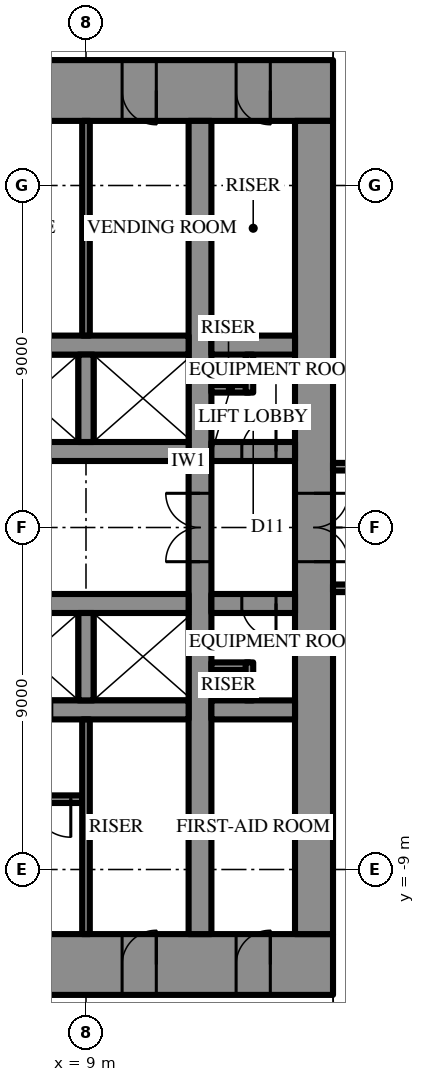
"""IFC4 building model, lengths in metres.
Left out: names, types, materials, properties, quantities, classifications, styles, units other than length and angle.
Written with IfcOpenShell. Run it as: python <this file> out.ifc"""

import sys

from ifc_helpers import new_model, si_unit, direction, frame, frame_2d, origin, place, context, subcontext, project, spatial, rectangle, extrude, element, fill, save


model = new_model("IFC4")
c1 = context("Model", 3, precision=1e-05, world=origin(), true_north=direction((0.0, 1.0)))
c2 = subcontext(c1, "Body", "Model", "MODEL_VIEW")
j1 = project(units=[si_unit("LENGTHUNIT", "METRE"), si_unit("PLANEANGLEUNIT", "RADIAN")], contexts=[c1])
p1 = place(None, origin())
s1 = spatial("IfcSite", under=j1, at=p1, CompositionType="ELEMENT")
p2 = place(p1, origin())
s2 = spatial("IfcBuilding", under=s1, at=p2, CompositionType="ELEMENT")
p3 = place(p2, frame((0.0, 0.0, 257.5)))
s3 = spatial("IfcBuildingStorey", under=s2, at=p3, CompositionType="ELEMENT", Elevation=257.5)
p4 = place(p3, frame((-15.5, 11.5, 0.0), z_axis=(0.0, 0.0, 1.0), x_axis=(1.0, 0.0, 0.0)))
e1 = element("IfcWall", 1, at=p4, inside=s3, PredefinedType="SHEAR", context=c2, shape_type="SweptSolid", body=[
    extrude(rectangle(XDim=31.0, YDim=1.6, at=frame_2d((15.5, 0.0))), origin(), (0.0, 0.0, 1.0), 4.2),
])
p5 = place(p4, frame((16.35, 0.0, 0.0)))
e2 = element("IfcOpeningElement", 2, at=p5, cuts=e1, PredefinedType="OPENING", context=c2, shape_type="SweptSolid", body=[
    extrude(rectangle(XDim=0.9, YDim=2.2, at=frame_2d((0.45, 1.1))), frame((0.0, 0.81, 0.0), z_axis=(0.0, -1.0, 0.0), x_axis=(1.0, 0.0, 0.0)), (0.0, 0.0, 1.0), 1.62),
])
p6 = place(p4, frame((19.35, 0.0, 0.0)))
e3 = element("IfcOpeningElement", 3, at=p6, cuts=e1, PredefinedType="OPENING", context=c2, shape_type="SweptSolid", body=[
    extrude(rectangle(XDim=0.9, YDim=2.2, at=frame_2d((0.45, 1.1))), frame((0.0, 0.81, 0.0), z_axis=(0.0, -1.0, 0.0), x_axis=(1.0, 0.0, 0.0)), (0.0, 0.0, 1.0), 1.62),
])
p7 = place(p4, frame((22.4, 0.0, 0.0)))
e4 = element("IfcOpeningElement", 4, at=p7, cuts=e1, PredefinedType="OPENING", context=c2, shape_type="SweptSolid", body=[
    extrude(rectangle(XDim=1.0, YDim=2.2, at=frame_2d((0.5, 1.1))), frame((0.0, 0.81, 0.0), z_axis=(0.0, -1.0, 0.0), x_axis=(1.0, 0.0, 0.0)), (0.0, 0.0, 1.0), 1.62),
])
p8 = place(p4, frame((1.65, 0.0, 0.0)))
e5 = element("IfcOpeningElement", 5, at=p8, cuts=e1, PredefinedType="OPENING", context=c2, shape_type="SweptSolid", body=[
    extrude(rectangle(XDim=0.9, YDim=2.2, at=frame_2d((0.45, 1.1))), frame((0.0, 0.81, 0.0), z_axis=(0.0, -1.0, 0.0), x_axis=(1.0, 0.0, 0.0)), (0.0, 0.0, 1.0), 1.62),
])
p9 = place(p4, frame((4.65, 0.0, 0.0)))
e6 = element("IfcOpeningElement", 6, at=p9, cuts=e1, PredefinedType="OPENING", context=c2, shape_type="SweptSolid", body=[
    extrude(rectangle(XDim=0.9, YDim=2.2, at=frame_2d((0.45, 1.1))), frame((0.0, 0.81, 0.0), z_axis=(0.0, -1.0, 0.0), x_axis=(1.0, 0.0, 0.0)), (0.0, 0.0, 1.0), 1.62),
])
p10 = place(p4, frame((25.45, 0.0, 0.0)))
e7 = element("IfcOpeningElement", 7, at=p10, cuts=e1, PredefinedType="OPENING", context=c2, shape_type="SweptSolid", body=[
    extrude(rectangle(XDim=0.9, YDim=2.2, at=frame_2d((0.45, 1.1))), frame((0.0, 0.81, 0.0), z_axis=(0.0, -1.0, 0.0), x_axis=(1.0, 0.0, 0.0)), (0.0, 0.0, 1.0), 1.62),
])
p11 = place(p4, frame((28.45, 0.0, 0.0)))
e8 = element("IfcOpeningElement", 8, at=p11, cuts=e1, PredefinedType="OPENING", context=c2, shape_type="SweptSolid", body=[
    extrude(rectangle(XDim=0.9, YDim=2.2, at=frame_2d((0.45, 1.1))), frame((0.0, 0.81, 0.0), z_axis=(0.0, -1.0, 0.0), x_axis=(1.0, 0.0, 0.0)), (0.0, 0.0, 1.0), 1.62),
])
p12 = place(p3, frame((15.5, -11.5, 0.0), z_axis=(0.0, 0.0, 1.0), x_axis=(-1.0, 0.0, 0.0)))
e9 = element("IfcWall", 9, at=p12, inside=s3, PredefinedType="SHEAR", context=c2, shape_type="SweptSolid", body=[
    extrude(rectangle(XDim=31.0, YDim=1.6, at=frame_2d((15.5, 0.0))), origin(), (0.0, 0.0, 1.0), 4.2),
])
p13 = place(p12, frame((16.35, 0.0, 0.0)))
e10 = element("IfcOpeningElement", 10, at=p13, cuts=e9, PredefinedType="OPENING", context=c2, shape_type="SweptSolid", body=[
    extrude(rectangle(XDim=0.9, YDim=2.2, at=frame_2d((0.45, 1.1))), frame((0.0, 0.81, 0.0), z_axis=(0.0, -1.0, 0.0), x_axis=(1.0, 0.0, 0.0)), (0.0, 0.0, 1.0), 1.62),
])
p14 = place(p12, frame((19.35, 0.0, 0.0)))
e11 = element("IfcOpeningElement", 11, at=p14, cuts=e9, PredefinedType="OPENING", context=c2, shape_type="SweptSolid", body=[
    extrude(rectangle(XDim=0.9, YDim=2.2, at=frame_2d((0.45, 1.1))), frame((0.0, 0.81, 0.0), z_axis=(0.0, -1.0, 0.0), x_axis=(1.0, 0.0, 0.0)), (0.0, 0.0, 1.0), 1.62),
])
p15 = place(p12, frame((22.4, 0.0, 0.0)))
e12 = element("IfcOpeningElement", 12, at=p15, cuts=e9, PredefinedType="OPENING", context=c2, shape_type="SweptSolid", body=[
    extrude(rectangle(XDim=1.0, YDim=2.2, at=frame_2d((0.5, 1.1))), frame((0.0, 0.81, 0.0), z_axis=(0.0, -1.0, 0.0), x_axis=(1.0, 0.0, 0.0)), (0.0, 0.0, 1.0), 1.62),
])
p16 = place(p12, frame((1.65, 0.0, 0.0)))
e13 = element("IfcOpeningElement", 13, at=p16, cuts=e9, PredefinedType="OPENING", context=c2, shape_type="SweptSolid", body=[
    extrude(rectangle(XDim=0.9, YDim=2.2, at=frame_2d((0.45, 1.1))), frame((0.0, 0.81, 0.0), z_axis=(0.0, -1.0, 0.0), x_axis=(1.0, 0.0, 0.0)), (0.0, 0.0, 1.0), 1.62),
])
p17 = place(p12, frame((4.65, 0.0, 0.0)))
e14 = element("IfcOpeningElement", 14, at=p17, cuts=e9, PredefinedType="OPENING", context=c2, shape_type="SweptSolid", body=[
    extrude(rectangle(XDim=0.9, YDim=2.2, at=frame_2d((0.45, 1.1))), frame((0.0, 0.81, 0.0), z_axis=(0.0, -1.0, 0.0), x_axis=(1.0, 0.0, 0.0)), (0.0, 0.0, 1.0), 1.62),
])
p18 = place(p12, frame((25.45, 0.0, 0.0)))
e15 = element("IfcOpeningElement", 15, at=p18, cuts=e9, PredefinedType="OPENING", context=c2, shape_type="SweptSolid", body=[
    extrude(rectangle(XDim=0.9, YDim=2.2, at=frame_2d((0.45, 1.1))), frame((0.0, 0.81, 0.0), z_axis=(0.0, -1.0, 0.0), x_axis=(1.0, 0.0, 0.0)), (0.0, 0.0, 1.0), 1.62),
])
p19 = place(p12, frame((28.45, 0.0, 0.0)))
e16 = element("IfcOpeningElement", 16, at=p19, cuts=e9, PredefinedType="OPENING", context=c2, shape_type="SweptSolid", body=[
    extrude(rectangle(XDim=0.9, YDim=2.2, at=frame_2d((0.45, 1.1))), frame((0.0, 0.81, 0.0), z_axis=(0.0, -1.0, 0.0), x_axis=(1.0, 0.0, 0.0)), (0.0, 0.0, 1.0), 1.62),
])
p20 = place(p3, frame((15.0, -10.7, 0.0), z_axis=(0.0, 0.0, 1.0), x_axis=(0.0, 1.0, 0.0)))
e17 = element("IfcWall", 17, at=p20, inside=s3, PredefinedType="SHEAR", context=c2, shape_type="SweptSolid", body=[
    extrude(rectangle(XDim=21.4, YDim=1.0, at=frame_2d((10.7, 0.0))), origin(), (0.0, 0.0, 1.0), 4.2),
])
p21 = place(p20, frame((9.8, 0.0, 0.0)))
e18 = element("IfcOpeningElement", 18, at=p21, cuts=e17, PredefinedType="OPENING", context=c2, shape_type="SweptSolid", body=[
    extrude(rectangle(XDim=1.8, YDim=2.4, at=frame_2d((0.9, 1.2))), frame((0.0, 0.51, 0.0), z_axis=(0.0, -1.0, 0.0), x_axis=(1.0, 0.0, 0.0)), (0.0, 0.0, 1.0), 1.02),
])
p22 = place(p3, frame((12.0, -10.7, 0.0), z_axis=(0.0, 0.0, 1.0), x_axis=(0.0, 1.0, 0.0)))
e19 = element("IfcWall", 19, at=p22, inside=s3, PredefinedType="SHEAR", context=c2, shape_type="SweptSolid", body=[
    extrude(rectangle(XDim=21.4, YDim=0.6, at=frame_2d((10.7, 0.0))), origin(), (0.0, 0.0, 1.0), 4.2),
])
p23 = place(p22, frame((9.8, 0.0, 0.0)))
e20 = element("IfcOpeningElement", 20, at=p23, cuts=e19, PredefinedType="OPENING", context=c2, shape_type="SweptSolid", body=[
    extrude(rectangle(XDim=1.8, YDim=2.4, at=frame_2d((0.9, 1.2))), frame((0.0, 0.31, 0.0), z_axis=(0.0, -1.0, 0.0), x_axis=(1.0, 0.0, 0.0)), (0.0, 0.0, 1.0), 0.62),
])
p24 = place(p3, frame((-3.2, 2.0, 0.0), z_axis=(0.0, 0.0, 1.0), x_axis=(1.0, 0.0, 0.0)))
e21 = element("IfcWall", 21, at=p24, inside=s3, PredefinedType="SHEAR", context=c2, shape_type="SweptSolid", body=[
    extrude(rectangle(XDim=14.9, YDim=0.5, at=frame_2d((7.45, 0.0))), origin(), (0.0, 0.0, 1.0), 4.2),
])
p25 = place(p24, frame((1.15, 0.0, 0.0)))
e22 = element("IfcOpeningElement", 22, at=p25, cuts=e21, PredefinedType="OPENING", context=c2, shape_type="SweptSolid", body=[
    extrude(rectangle(XDim=1.1, YDim=2.2, at=frame_2d((0.55, 1.1))), frame((0.0, 0.26, 0.0), z_axis=(0.0, -1.0, 0.0), x_axis=(1.0, 0.0, 0.0)), (0.0, 0.0, 1.0), 0.52),
])
p26 = place(p24, frame((4.15, 0.0, 0.0)))
e23 = element("IfcOpeningElement", 23, at=p26, cuts=e21, PredefinedType="OPENING", context=c2, shape_type="SweptSolid", body=[
    extrude(rectangle(XDim=1.1, YDim=2.2, at=frame_2d((0.55, 1.1))), frame((0.0, 0.26, 0.0), z_axis=(0.0, -1.0, 0.0), x_axis=(1.0, 0.0, 0.0)), (0.0, 0.0, 1.0), 0.52),
])
p27 = place(p24, frame((7.15, 0.0, 0.0)))
e24 = element("IfcOpeningElement", 24, at=p27, cuts=e21, PredefinedType="OPENING", context=c2, shape_type="SweptSolid", body=[
    extrude(rectangle(XDim=1.1, YDim=2.2, at=frame_2d((0.55, 1.1))), frame((0.0, 0.26, 0.0), z_axis=(0.0, -1.0, 0.0), x_axis=(1.0, 0.0, 0.0)), (0.0, 0.0, 1.0), 0.52),
])
p28 = place(p24, frame((10.15, 0.0, 0.0)))
e25 = element("IfcOpeningElement", 25, at=p28, cuts=e21, PredefinedType="OPENING", context=c2, shape_type="SweptSolid", body=[
    extrude(rectangle(XDim=1.1, YDim=2.2, at=frame_2d((0.55, 1.1))), frame((0.0, 0.26, 0.0), z_axis=(0.0, -1.0, 0.0), x_axis=(1.0, 0.0, 0.0)), (0.0, 0.0, 1.0), 0.52),
])
p29 = place(p3, frame((12.3, 2.0, 0.0), z_axis=(0.0, 0.0, 1.0), x_axis=(1.0, 0.0, 0.0)))
e26 = element("IfcWall", 26, at=p29, inside=s3, PredefinedType="SHEAR", context=c2, shape_type="SweptSolid", body=[
    extrude(rectangle(XDim=2.2, YDim=0.5, at=frame_2d((1.1, 0.0))), origin(), (0.0, 0.0, 1.0), 4.2),
])
p30 = place(p29, frame((0.8, 0.0, 0.0)))
e27 = element("IfcOpeningElement", 27, at=p30, cuts=e26, PredefinedType="OPENING", context=c2, shape_type="SweptSolid", body=[
    extrude(rectangle(XDim=0.9, YDim=2.2, at=frame_2d((0.45, 1.1))), frame((0.0, 0.26, 0.0), z_axis=(0.0, -1.0, 0.0), x_axis=(1.0, 0.0, 0.0)), (0.0, 0.0, 1.0), 0.52),
])
p31 = place(p3, frame((-11.7, 4.8, 0.0), z_axis=(0.0, 0.0, 1.0), x_axis=(1.0, 0.0, 0.0)))
e28 = element("IfcWall", 28, at=p31, inside=s3, PredefinedType="SHEAR", context=c2, shape_type="SweptSolid", body=[
    extrude(rectangle(XDim=23.4, YDim=0.5, at=frame_2d((11.7, 0.0))), origin(), (0.0, 0.0, 1.0), 4.2),
])
p32 = place(p31, frame((6.6, 0.0, 0.0)))
e29 = element("IfcOpeningElement", 29, at=p32, cuts=e28, PredefinedType="OPENING", context=c2, shape_type="SweptSolid", body=[
    extrude(rectangle(XDim=1.2, YDim=2.2, at=frame_2d((0.6, 1.1))), frame((0.0, 0.26, 0.0), z_axis=(0.0, -1.0, 0.0), x_axis=(1.0, 0.0, 0.0)), (0.0, 0.0, 1.0), 0.52),
])
p33 = place(p31, frame((3.6, 0.0, 0.0)))
e30 = element("IfcOpeningElement", 30, at=p33, cuts=e28, PredefinedType="OPENING", context=c2, shape_type="SweptSolid", body=[
    extrude(rectangle(XDim=1.2, YDim=2.2, at=frame_2d((0.6, 1.1))), frame((0.0, 0.26, 0.0), z_axis=(0.0, -1.0, 0.0), x_axis=(1.0, 0.0, 0.0)), (0.0, 0.0, 1.0), 0.52),
])
p34 = place(p3, frame((12.3, 4.8, 0.0), z_axis=(0.0, 0.0, 1.0), x_axis=(1.0, 0.0, 0.0)))
e31 = element("IfcWall", 31, at=p34, inside=s3, PredefinedType="SHEAR", context=c2, shape_type="SweptSolid", body=[
    extrude(rectangle(XDim=2.2, YDim=0.5, at=frame_2d((1.1, 0.0))), origin(), (0.0, 0.0, 1.0), 4.2),
])
p35 = place(p3, frame((9.0, 2.25, 0.0), z_axis=(0.0, 0.0, 1.0), x_axis=(0.0, 1.0, 0.0)))
e32 = element("IfcWall", 32, at=p35, inside=s3, PredefinedType="SHEAR", context=c2, shape_type="SweptSolid", body=[
    extrude(rectangle(XDim=2.3, YDim=0.4, at=frame_2d((1.15, 0.0))), origin(), (0.0, 0.0, 1.0), 4.2),
])
p36 = place(p3, frame((14.5, -2.0, 0.0), z_axis=(0.0, 0.0, 1.0), x_axis=(-1.0, 0.0, 0.0)))
e33 = element("IfcWall", 33, at=p36, inside=s3, PredefinedType="SHEAR", context=c2, shape_type="SweptSolid", body=[
    extrude(rectangle(XDim=2.2, YDim=0.5, at=frame_2d((1.1, 0.0))), origin(), (0.0, 0.0, 1.0), 4.2),
])
p37 = place(p36, frame((0.5, 0.0, 0.0)))
e34 = element("IfcOpeningElement", 34, at=p37, cuts=e33, PredefinedType="OPENING", context=c2, shape_type="SweptSolid", body=[
    extrude(rectangle(XDim=0.9, YDim=2.2, at=frame_2d((0.45, 1.1))), frame((0.0, 0.26, 0.0), z_axis=(0.0, -1.0, 0.0), x_axis=(1.0, 0.0, 0.0)), (0.0, 0.0, 1.0), 0.52),
])
p38 = place(p3, frame((11.7, -2.0, 0.0), z_axis=(0.0, 0.0, 1.0), x_axis=(-1.0, 0.0, 0.0)))
e35 = element("IfcWall", 35, at=p38, inside=s3, PredefinedType="SHEAR", context=c2, shape_type="SweptSolid", body=[
    extrude(rectangle(XDim=5.9, YDim=0.5, at=frame_2d((2.95, 0.0))), origin(), (0.0, 0.0, 1.0), 4.2),
])
p39 = place(p3, frame((14.5, -4.8, 0.0), z_axis=(0.0, 0.0, 1.0), x_axis=(-1.0, 0.0, 0.0)))
e36 = element("IfcWall", 36, at=p39, inside=s3, PredefinedType="SHEAR", context=c2, shape_type="SweptSolid", body=[
    extrude(rectangle(XDim=2.2, YDim=0.5, at=frame_2d((1.1, 0.0))), origin(), (0.0, 0.0, 1.0), 4.2),
])
p40 = place(p3, frame((11.7, -4.8, 0.0), z_axis=(0.0, 0.0, 1.0), x_axis=(-1.0, 0.0, 0.0)))
e37 = element("IfcWall", 37, at=p40, inside=s3, PredefinedType="SHEAR", context=c2, shape_type="SweptSolid", body=[
    extrude(rectangle(XDim=23.4, YDim=0.5, at=frame_2d((11.7, 0.0))), origin(), (0.0, 0.0, 1.0), 4.2),
])
p41 = place(p40, frame((6.6, 0.0, 0.0)))
e38 = element("IfcOpeningElement", 38, at=p41, cuts=e37, PredefinedType="OPENING", context=c2, shape_type="SweptSolid", body=[
    extrude(rectangle(XDim=1.2, YDim=2.2, at=frame_2d((0.6, 1.1))), frame((0.0, 0.26, 0.0), z_axis=(0.0, -1.0, 0.0), x_axis=(1.0, 0.0, 0.0)), (0.0, 0.0, 1.0), 0.52),
])
p42 = place(p40, frame((3.6, 0.0, 0.0)))
e39 = element("IfcOpeningElement", 39, at=p42, cuts=e37, PredefinedType="OPENING", context=c2, shape_type="SweptSolid", body=[
    extrude(rectangle(XDim=1.2, YDim=2.2, at=frame_2d((0.6, 1.1))), frame((0.0, 0.26, 0.0), z_axis=(0.0, -1.0, 0.0), x_axis=(1.0, 0.0, 0.0)), (0.0, 0.0, 1.0), 0.52),
])
p43 = place(p3, frame((9.0, -2.25, 0.0), z_axis=(0.0, 0.0, 1.0), x_axis=(0.0, -1.0, 0.0)))
e40 = element("IfcWall", 40, at=p43, inside=s3, PredefinedType="SHEAR", context=c2, shape_type="SweptSolid", body=[
    extrude(rectangle(XDim=2.3, YDim=0.4, at=frame_2d((1.15, 0.0))), origin(), (0.0, 0.0, 1.0), 4.2),
])
p44 = place(p3, frame((8.9, -7.15, 0.0), z_axis=(0.0, 0.0, 1.0), x_axis=(-1.0, 0.0, 0.0)))
e41 = element("IfcWall", 41, at=p44, inside=s3, PredefinedType="SHEAR", context=c2, shape_type="SweptSolid", body=[
    extrude(rectangle(XDim=8.6, YDim=0.2, at=frame_2d((4.3, 0.0))), origin(), (0.0, 0.0, 1.0), 4.2),
])
p45 = place(p44, frame((0.3, 0.0, 0.0)))
e42 = element("IfcOpeningElement", 42, at=p45, cuts=e41, PredefinedType="OPENING", context=c2, shape_type="SweptSolid", body=[
    extrude(rectangle(XDim=1.0, YDim=2.2, at=frame_2d((0.5, 1.1))), frame((0.0, 0.11, 0.0), z_axis=(0.0, -1.0, 0.0), x_axis=(1.0, 0.0, 0.0)), (0.0, 0.0, 1.0), 0.22),
])
for number, where, z_axis, x_axis in (
    (43, (9.0, 5.05, 0.0), (0.0, 0.0, 1.0), (0.0, 1.0, 0.0)),
    (44, (9.0, -5.05, 0.0), (0.0, 0.0, 1.0), (0.0, -1.0, 0.0)),
):
    element("IfcWall", number, at=place(p3, frame(where, z_axis=z_axis, x_axis=x_axis)), inside=s3, PredefinedType="PARTITIONING", context=c2, shape_type="SweptSolid", body=[
        extrude(rectangle(XDim=5.65, YDim=0.2, at=frame_2d((2.825, 0.0))), origin(), (0.0, 0.0, 1.0), 4.0),
    ])
for number, where, z_axis, x_axis in (
    (45, (12.3, 3.65, 0.0), (0.0, 0.0, 1.0), (1.0, 0.0, 0.0)),
    (46, (13.3, 3.55, 0.0), (0.0, 0.0, 1.0), (0.0, 1.0, 0.0)),
    (47, (13.3, -3.65, 0.0), (0.0, 0.0, 1.0), (-1.0, 0.0, 0.0)),
    (48, (13.3, -3.55, 0.0), (0.0, 0.0, 1.0), (0.0, -1.0, 0.0)),
):
    element("IfcWall", number, at=place(p3, frame(where, z_axis=z_axis, x_axis=x_axis)), inside=s3, PredefinedType="PARTITIONING", context=c2, shape_type="SweptSolid", body=[
        extrude(rectangle(XDim=1.0, YDim=0.2, at=frame_2d((0.5, 0.0))), origin(), (0.0, 0.0, 1.0), 4.0),
    ])
p46 = place(p3, frame((15.5, 1.6, 0.0), z_axis=(0.0, 0.0, 1.0), x_axis=(1.0, 0.0, 0.0)))
e49 = element("IfcWall", 49, at=p46, inside=s3, PredefinedType="PARTITIONING", context=c2, shape_type="SweptSolid", body=[
    extrude(rectangle(XDim=2.3, YDim=0.2, at=frame_2d((1.15, 0.0))), origin(), (0.0, 0.0, 1.0), 4.0),
])
p47 = place(p3, frame((15.5, -1.6, 0.0), z_axis=(0.0, 0.0, 1.0), x_axis=(1.0, 0.0, 0.0)))
e50 = element("IfcWall", 50, at=p47, inside=s3, PredefinedType="PARTITIONING", context=c2, shape_type="SweptSolid", body=[
    extrude(rectangle(XDim=9.7, YDim=0.2, at=frame_2d((4.85, 0.0))), origin(), (0.0, 0.0, 1.0), 4.0),
])
p48 = place(p47, frame((6.29, 0.0, 0.0)))
e51 = element("IfcOpeningElement", 51, at=p48, cuts=e50, PredefinedType="OPENING", context=c2, shape_type="SweptSolid", body=[
    extrude(rectangle(XDim=1.0, YDim=2.2, at=frame_2d((0.5, 1.1))), frame((0.0, 0.11, 0.0), z_axis=(0.0, -1.0, 0.0), x_axis=(1.0, 0.0, 0.0)), (0.0, 0.0, 1.0), 0.22),
])
p49 = place(p21, frame((1.8, 0.0, 0.0), z_axis=(0.0, 0.0, 1.0), x_axis=(-1.0, 0.0, 0.0)))
e52 = element("IfcDoor", 52, at=p49, inside=s3, OperationType="DOUBLE_DOOR_SINGLE_SWING", PredefinedType="DOOR", context=c2, shape_type="SweptSolid", body=[
    extrude(rectangle(XDim=1.8, YDim=2.4, at=frame_2d((0.9, 1.2))), frame((0.0, 0.025, 0.0), z_axis=(0.0, -1.0, 0.0), x_axis=(1.0, 0.0, 0.0)), (0.0, 0.0, 1.0), 0.05),
])
fill(e18, e52)
p50 = place(p10, frame((0.9, 0.0, 0.0), z_axis=(0.0, 0.0, 1.0), x_axis=(-1.0, 0.0, 0.0)))
e53 = element("IfcDoor", 53, at=p50, inside=s3, OperationType="SINGLE_SWING_RIGHT", PredefinedType="DOOR", context=c2, shape_type="SweptSolid", body=[
    extrude(rectangle(XDim=0.9, YDim=2.2, at=frame_2d((0.45, 1.1))), frame((0.0, 0.025, 0.0), z_axis=(0.0, -1.0, 0.0), x_axis=(1.0, 0.0, 0.0)), (0.0, 0.0, 1.0), 0.05),
])
fill(e7, e53)
p51 = place(p11, frame((0.9, 0.0, 0.0), z_axis=(0.0, 0.0, 1.0), x_axis=(-1.0, 0.0, 0.0)))
e54 = element("IfcDoor", 54, at=p51, inside=s3, OperationType="SINGLE_SWING_RIGHT", PredefinedType="DOOR", context=c2, shape_type="SweptSolid", body=[
    extrude(rectangle(XDim=0.9, YDim=2.2, at=frame_2d((0.45, 1.1))), frame((0.0, 0.025, 0.0), z_axis=(0.0, -1.0, 0.0), x_axis=(1.0, 0.0, 0.0)), (0.0, 0.0, 1.0), 0.05),
])
fill(e8, e54)
p52 = place(p45, origin())
e55 = element("IfcDoor", 55, at=p52, inside=s3, OperationType="SINGLE_SWING_RIGHT", PredefinedType="DOOR", context=c2, shape_type="SweptSolid", body=[
    extrude(rectangle(XDim=1.0, YDim=2.2, at=frame_2d((0.5, 1.1))), frame((0.0, 0.025, 0.0), z_axis=(0.0, -1.0, 0.0), x_axis=(1.0, 0.0, 0.0)), (0.0, 0.0, 1.0), 0.05),
])
fill(e42, e55)
p53 = place(p16, frame((0.9, 0.0, 0.0), z_axis=(0.0, 0.0, 1.0), x_axis=(-1.0, 0.0, 0.0)))
e56 = element("IfcDoor", 56, at=p53, inside=s3, OperationType="SINGLE_SWING_LEFT", PredefinedType="DOOR", context=c2, shape_type="SweptSolid", body=[
    extrude(rectangle(XDim=0.9, YDim=2.2, at=frame_2d((0.45, 1.1))), frame((0.0, 0.025, 0.0), z_axis=(0.0, -1.0, 0.0), x_axis=(1.0, 0.0, 0.0)), (0.0, 0.0, 1.0), 0.05),
])
fill(e13, e56)
p54 = place(p17, frame((0.9, 0.0, 0.0), z_axis=(0.0, 0.0, 1.0), x_axis=(-1.0, 0.0, 0.0)))
e57 = element("IfcDoor", 57, at=p54, inside=s3, OperationType="SINGLE_SWING_LEFT", PredefinedType="DOOR", context=c2, shape_type="SweptSolid", body=[
    extrude(rectangle(XDim=0.9, YDim=2.2, at=frame_2d((0.45, 1.1))), frame((0.0, 0.025, 0.0), z_axis=(0.0, -1.0, 0.0), x_axis=(1.0, 0.0, 0.0)), (0.0, 0.0, 1.0), 0.05),
])
fill(e14, e57)
p55 = place(p30, origin())
e58 = element("IfcDoor", 58, at=p55, inside=s3, OperationType="SINGLE_SWING_LEFT", PredefinedType="DOOR", context=c2, shape_type="SweptSolid", body=[
    extrude(rectangle(XDim=0.9, YDim=2.2, at=frame_2d((0.45, 1.1))), frame((0.0, 0.025, 0.0), z_axis=(0.0, -1.0, 0.0), x_axis=(1.0, 0.0, 0.0)), (0.0, 0.0, 1.0), 0.05),
])
fill(e27, e58)
p56 = place(p37, origin())
e59 = element("IfcDoor", 59, at=p56, inside=s3, OperationType="SINGLE_SWING_RIGHT", PredefinedType="DOOR", context=c2, shape_type="SweptSolid", body=[
    extrude(rectangle(XDim=0.9, YDim=2.2, at=frame_2d((0.45, 1.1))), frame((0.0, 0.025, 0.0), z_axis=(0.0, -1.0, 0.0), x_axis=(1.0, 0.0, 0.0)), (0.0, 0.0, 1.0), 0.05),
])
fill(e34, e59)
p57 = place(p23, origin())
e60 = element("IfcDoor", 60, at=p57, inside=s3, OperationType="DOUBLE_DOOR_SINGLE_SWING", PredefinedType="DOOR", context=c2, shape_type="SweptSolid", body=[
    extrude(rectangle(XDim=1.8, YDim=2.4, at=frame_2d((0.9, 1.2))), frame((0.0, 0.025, 0.0), z_axis=(0.0, -1.0, 0.0), x_axis=(1.0, 0.0, 0.0)), (0.0, 0.0, 1.0), 0.05),
])
fill(e20, e60)
save(model, sys.argv[1])
